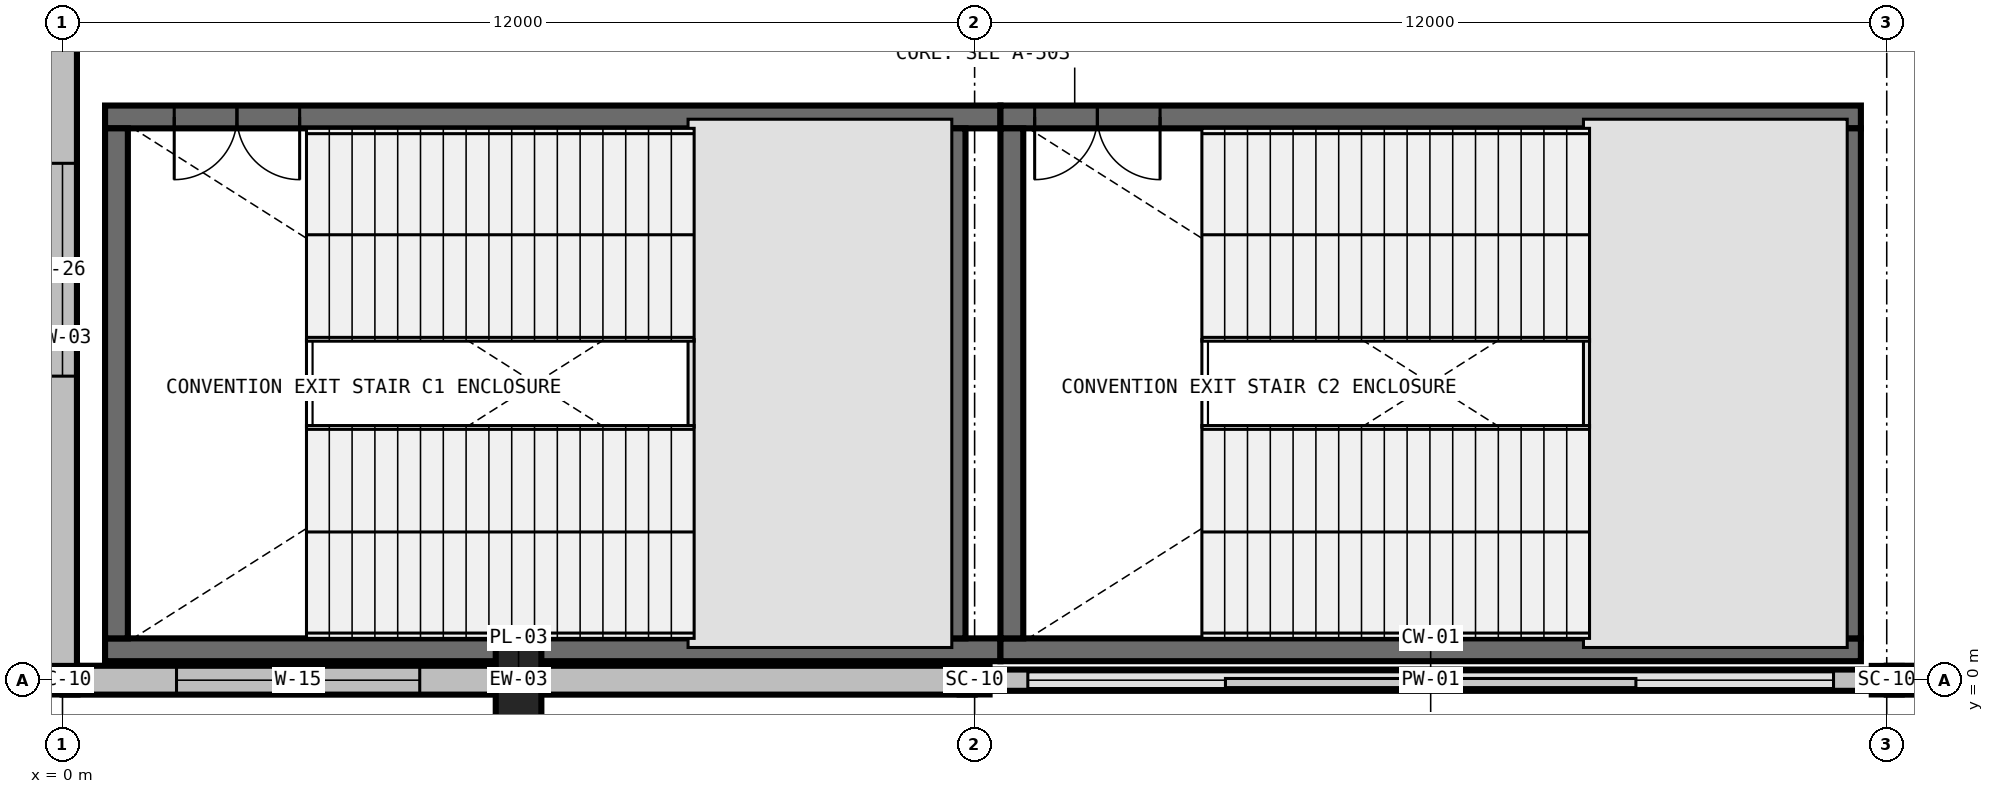
"""IFC4 building model, lengths in metres.
Left out: names, types, materials, properties, quantities, classifications, styles, units other than length and angle.
Written with IfcOpenShell. Run it as: python <this file> out.ifc"""

import sys

from ifc_helpers import new_model, si_unit, direction, frame, frame_2d, origin, origin_with_axes, origin_2d, place, context, subcontext, project, spatial, rectangle, i_section, extrude, element, fill, save


model = new_model("IFC4")
c1 = context("Model", 3, precision=1e-05, world=origin(), true_north=direction((0.0, 1.0)))
c2 = subcontext(c1, "Body", "Model", "MODEL_VIEW")
j1 = project(units=[si_unit("LENGTHUNIT", "METRE"), si_unit("PLANEANGLEUNIT", "RADIAN")], contexts=[c1])
p1 = place(None, origin())
s1 = spatial("IfcSite", under=j1, at=p1, CompositionType="ELEMENT")
p2 = place(p1, origin())
s2 = spatial("IfcBuilding", under=s1, at=p2, CompositionType="ELEMENT")
p3 = place(p2, frame((0.0, 0.0, 12.0)))
s3 = spatial("IfcBuildingStorey", under=s2, at=p3, CompositionType="ELEMENT", Elevation=12.0)
for number, where, z_axis, x_axis in (
    (1, (0.0, 0.0, 0.0), (0.0, 0.0, 1.0), (1.0, 0.0, 0.0)),
    (2, (12.0, 0.0, 0.0), (0.0, 0.0, 1.0), (1.0, 0.0, 0.0)),
    (3, (24.0, 0.0, 0.0), (0.0, 0.0, 1.0), (1.0, 0.0, 0.0)),
):
    element("IfcColumn", number, at=place(p3, frame(where, z_axis=z_axis, x_axis=x_axis)), inside=s3, PredefinedType="COLUMN", context=c2, shape_type="SweptSolid", body=[
        extrude(i_section(OverallWidth=0.394, OverallDepth=0.375, WebThickness=0.017, FlangeThickness=0.028, FilletRadius=0.031, at=origin_2d()), origin(), (0.0, 0.0, 1.0), 6.0),
    ])
p4 = place(p3, frame((6.0, 0.0, 0.0), z_axis=(0.0, 0.0, 1.0), x_axis=(1.0, 0.0, 0.0)))
e4 = element("IfcColumn", 4, at=p4, inside=s3, PredefinedType="PILASTER", context=c2, shape_type="SweptSolid", body=[
    extrude(rectangle(XDim=0.6, YDim=1.0, at=origin_2d()), origin(), (0.0, 0.0, 1.0), 6.0),
])
p5 = place(p3, frame((12.34, 0.4, 0.0), z_axis=(0.0, 0.0, 1.0), x_axis=(-1.0, 0.0, 0.0)))
e5 = element("IfcWall", 5, at=p5, inside=s3, PredefinedType="SHEAR", context=c2, shape_type="SweptSolid", body=[
    extrude(rectangle(XDim=11.78, YDim=0.3, at=frame_2d((5.89, 0.0))), origin(), (0.0, 0.0, 1.0), 6.0),
])
p6 = place(p3, frame((12.34, 7.41, 0.0), z_axis=(0.0, 0.0, 1.0), x_axis=(-1.0, 0.0, 0.0)))
e6 = element("IfcWall", 6, at=p6, inside=s3, PredefinedType="SHEAR", context=c2, shape_type="SweptSolid", body=[
    extrude(rectangle(XDim=11.78, YDim=0.3, at=frame_2d((5.89, 0.0))), origin(), (0.0, 0.0, 1.0), 6.0),
])
p7 = place(p6, frame((9.22, 0.0, 0.0)))
e7 = element("IfcOpeningElement", 7, at=p7, cuts=e6, PredefinedType="OPENING", context=c2, shape_type="SweptSolid", body=[
    extrude(rectangle(XDim=1.65, YDim=2.25, at=frame_2d((0.825, 1.125))), frame((0.0, 0.165, 0.0), z_axis=(0.0, -1.0, 0.0), x_axis=(1.0, 0.0, 0.0)), (0.0, 0.0, 1.0), 0.33),
])
for number, where, z_axis, x_axis in (
    (8, (0.71, 7.26, 0.0), (0.0, 0.0, 1.0), (0.0, -1.0, 0.0)),
    (9, (11.73, 0.55, 0.0), (0.0, 0.0, 1.0), (0.0, 1.0, 0.0)),
):
    element("IfcWall", number, at=place(p3, frame(where, z_axis=z_axis, x_axis=x_axis)), inside=s3, PredefinedType="SHEAR", context=c2, shape_type="SweptSolid", body=[
        extrude(rectangle(XDim=6.71, YDim=0.3, at=frame_2d((3.355, 0.0))), origin(), (0.0, 0.0, 1.0), 6.0),
    ])
p8 = place(p3, frame((23.66, 0.4, 0.0), z_axis=(0.0, 0.0, 1.0), x_axis=(-1.0, 0.0, 0.0)))
e10 = element("IfcWall", 10, at=p8, inside=s3, PredefinedType="SHEAR", context=c2, shape_type="SweptSolid", body=[
    extrude(rectangle(XDim=11.32, YDim=0.3, at=frame_2d((5.66, 0.0))), origin(), (0.0, 0.0, 1.0), 6.0),
])
p9 = place(p3, frame((23.66, 7.41, 0.0), z_axis=(0.0, 0.0, 1.0), x_axis=(-1.0, 0.0, 0.0)))
e11 = element("IfcWall", 11, at=p9, inside=s3, PredefinedType="SHEAR", context=c2, shape_type="SweptSolid", body=[
    extrude(rectangle(XDim=11.32, YDim=0.3, at=frame_2d((5.66, 0.0))), origin(), (0.0, 0.0, 1.0), 6.0),
])
p10 = place(p9, frame((9.22, 0.0, 0.0)))
e12 = element("IfcOpeningElement", 12, at=p10, cuts=e11, PredefinedType="OPENING", context=c2, shape_type="SweptSolid", body=[
    extrude(rectangle(XDim=1.65, YDim=2.25, at=frame_2d((0.825, 1.125))), frame((0.0, 0.165, 0.0), z_axis=(0.0, -1.0, 0.0), x_axis=(1.0, 0.0, 0.0)), (0.0, 0.0, 1.0), 0.33),
])
for number, where, z_axis, x_axis in (
    (13, (12.49, 7.26, 0.0), (0.0, 0.0, 1.0), (0.0, -1.0, 0.0)),
    (14, (23.51, 0.55, 0.0), (0.0, 0.0, 1.0), (0.0, 1.0, 0.0)),
):
    element("IfcWall", number, at=place(p3, frame(where, z_axis=z_axis, x_axis=x_axis)), inside=s3, PredefinedType="SHEAR", context=c2, shape_type="SweptSolid", body=[
        extrude(rectangle(XDim=6.71, YDim=0.3, at=frame_2d((3.355, 0.0))), origin(), (0.0, 0.0, 1.0), 6.0),
    ])
p11 = place(p3, origin_with_axes())
e15 = element("IfcWall", 15, at=p11, inside=s3, PredefinedType="STANDARD", context=c2, shape_type="SweptSolid", body=[
    extrude(rectangle(XDim=12.0, YDim=0.38, at=frame_2d((6.0, 0.0))), origin(), (0.0, 0.0, 1.0), 4.746),
])
p12 = place(p11, frame((1.5, 0.0, 0.85)))
e16 = element("IfcOpeningElement", 16, at=p12, cuts=e15, PredefinedType="OPENING", context=c2, shape_type="SweptSolid", body=[
    extrude(rectangle(XDim=3.2, YDim=2.4, at=frame_2d((1.6, 1.2))), frame((0.0, 0.205, 0.0), z_axis=(0.0, -1.0, 0.0), x_axis=(1.0, 0.0, 0.0)), (0.0, 0.0, 1.0), 0.41),
])
p13 = place(p3, frame((12.0, 0.0, 0.0), z_axis=(0.0, 0.0, 1.0), x_axis=(1.0, 0.0, 0.0)))
e17 = element("IfcWall", 17, at=p13, inside=s3, PredefinedType="PARAPET", context=c2, shape_type="SweptSolid", body=[
    extrude(rectangle(XDim=12.0, YDim=0.28, at=frame_2d((6.0, 0.0))), origin(), (0.0, 0.0, 1.0), 0.2),
])
p14 = place(p3, frame((24.0, 0.0, 0.0), z_axis=(0.0, 0.0, 1.0), x_axis=(1.0, 0.0, 0.0)))
e18 = element("IfcWall", 18, at=p14, inside=s3, PredefinedType="STANDARD", context=c2, shape_type="SweptSolid", body=[
    extrude(rectangle(XDim=6.0, YDim=0.38, at=frame_2d((3.0, 0.0))), origin(), (0.0, 0.0, 1.0), 4.746),
])
p15 = place(p3, frame((0.0, 9.0, 0.0), z_axis=(0.0, 0.0, 1.0), x_axis=(0.0, -1.0, 0.0)))
e19 = element("IfcWall", 19, at=p15, inside=s3, PredefinedType="STANDARD", context=c2, shape_type="SweptSolid", body=[
    extrude(rectangle(XDim=9.0, YDim=0.38, at=frame_2d((4.5, 0.0))), origin(), (0.0, 0.0, 1.0), 5.239),
])
p16 = place(p15, frame((2.2, 0.0, 1.0)))
e20 = element("IfcOpeningElement", 20, at=p16, cuts=e19, PredefinedType="OPENING", context=c2, shape_type="SweptSolid", body=[
    extrude(rectangle(XDim=2.8, YDim=1.0, at=frame_2d((1.4, 0.5))), frame((0.0, 0.205, 0.0), z_axis=(0.0, -1.0, 0.0), x_axis=(1.0, 0.0, 0.0)), (0.0, 0.0, 1.0), 0.41),
])
p17 = place(p7, origin())
e21 = element("IfcDoor", 21, at=p17, inside=s3, OperationType="DOUBLE_DOOR_SINGLE_SWING", PredefinedType="DOOR", context=c2, shape_type="SweptSolid", body=[
    extrude(rectangle(XDim=1.65, YDim=2.25, at=frame_2d((0.825, 1.125))), frame((0.0, 0.025, 0.0), z_axis=(0.0, -1.0, 0.0), x_axis=(1.0, 0.0, 0.0)), (0.0, 0.0, 1.0), 0.05),
])
fill(e7, e21)
p18 = place(p10, origin())
e22 = element("IfcDoor", 22, at=p18, inside=s3, OperationType="DOUBLE_DOOR_SINGLE_SWING", PredefinedType="DOOR", context=c2, shape_type="SweptSolid", body=[
    extrude(rectangle(XDim=1.65, YDim=2.25, at=frame_2d((0.825, 1.125))), frame((0.0, 0.025, 0.0), z_axis=(0.0, -1.0, 0.0), x_axis=(1.0, 0.0, 0.0)), (0.0, 0.0, 1.0), 0.05),
])
fill(e12, e22)
p19 = place(p12, origin())
e23 = element("IfcWindow", 23, at=p19, inside=s3, PartitioningType="TRIPLE_PANEL_VERTICAL", PredefinedType="WINDOW", context=c2, shape_type="SweptSolid", body=[
    extrude(rectangle(XDim=3.2, YDim=2.4, at=frame_2d((1.6, 1.2))), frame((0.0, 0.03, 0.0), z_axis=(0.0, -1.0, 0.0), x_axis=(1.0, 0.0, 0.0)), (0.0, 0.0, 1.0), 0.06),
])
fill(e16, e23)
p20 = place(p16, origin())
e24 = element("IfcWindow", 24, at=p20, inside=s3, PartitioningType="DOUBLE_PANEL_HORIZONTAL", PredefinedType="WINDOW", context=c2, shape_type="SweptSolid", body=[
    extrude(rectangle(XDim=2.8, YDim=1.0, at=frame_2d((1.4, 0.5))), frame((0.0, 0.03, 0.0), z_axis=(0.0, -1.0, 0.0), x_axis=(1.0, 0.0, 0.0)), (0.0, 0.0, 1.0), 0.06),
])
fill(e20, e24)
save(model, sys.argv[1])
